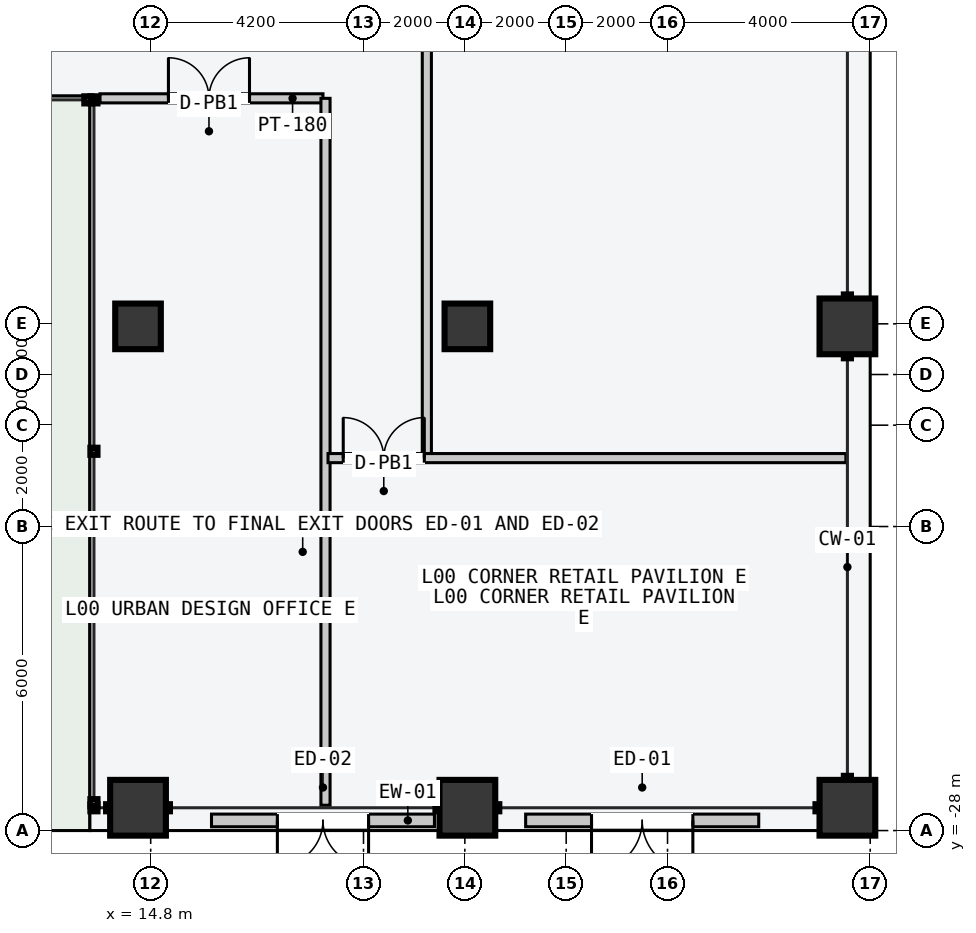
"""IFC4 building model, lengths in metres.
Left out: names, types, materials, properties, quantities, classifications, styles, units other than length and angle.
Written with IfcOpenShell. Run it as: python <this file> out.ifc"""

import sys

from ifc_helpers import new_model, si_unit, direction, frame, frame_2d, origin, origin_2d, place, context, subcontext, project, spatial, rectangle, hollow_rectangle, extrude, element, fill, save


model = new_model("IFC4")
c1 = context("Model", 3, precision=1e-05, world=origin(), true_north=direction((0.0, 1.0)))
c2 = subcontext(c1, "Body", "Model", "MODEL_VIEW")
j1 = project(units=[si_unit("LENGTHUNIT", "METRE"), si_unit("PLANEANGLEUNIT", "RADIAN")], contexts=[c1])
p1 = place(None, origin())
s1 = spatial("IfcSite", under=j1, at=p1, CompositionType="ELEMENT")
p2 = place(p1, origin())
s2 = spatial("IfcBuilding", under=s1, at=p2, CompositionType="ELEMENT")
p3 = place(p2, origin())
s3 = spatial("IfcBuildingStorey", under=s2, at=p3, CompositionType="ELEMENT", Elevation=0.0)
for number, where, z_axis, x_axis in (
    (1, (14.55, -18.05, 0.0), (0.0, 0.0, 1.0), (1.0, 0.0, 0.0)),
    (2, (21.05, -18.05, 0.0), (0.0, 0.0, 1.0), (1.0, 0.0, 0.0)),
):
    element("IfcColumn", number, at=place(p3, frame(where, z_axis=z_axis, x_axis=x_axis)), inside=s3, PredefinedType="COLUMN", context=c2, shape_type="SweptSolid", body=[
        extrude(hollow_rectangle(XDim=0.9, YDim=0.9, WallThickness=0.045, at=origin_2d()), origin(), (0.0, 0.0, 1.0), 4.8),
    ])
for number, where, z_axis, x_axis in (
    (3, (14.55, -27.55, 0.0), (0.0, 0.0, 1.0), (1.0, 0.0, 0.0)),
    (4, (21.05, -27.55, 0.0), (0.0, 0.0, 1.0), (1.0, 0.0, 0.0)),
    (5, (28.55, -27.55, 0.0), (0.0, 0.0, 1.0), (1.0, 0.0, 0.0)),
    (6, (28.55, -18.05, 0.0), (0.0, 0.0, 1.0), (0.0, 1.0, 0.0)),
):
    element("IfcColumn", number, at=place(p3, frame(where, z_axis=z_axis, x_axis=x_axis)), inside=s3, PredefinedType="COLUMN", context=c2, shape_type="SweptSolid", body=[
        extrude(hollow_rectangle(XDim=1.1, YDim=1.1, WallThickness=0.055, at=origin_2d()), origin(), (0.0, 0.0, 1.0), 4.8),
    ])
p4 = place(p3, frame((20.25, -20.6, 0.0), z_axis=(0.0, 0.0, 1.0), x_axis=(0.0, 1.0, 0.0)))
e7 = element("IfcWall", 7, at=p4, inside=s3, PredefinedType="PARTITIONING", context=c2, shape_type="SweptSolid", body=[
    extrude(rectangle(XDim=37.3, YDim=0.18, at=frame_2d((18.65, 0.0))), origin(), (0.0, 0.0, 1.0), 4.58),
])
p5 = place(p4, frame((13.925, 0.0, 0.0)))
e8 = element("IfcOpeningElement", 8, at=p5, cuts=e7, PredefinedType="OPENING", context=c2, shape_type="SweptSolid", body=[
    extrude(rectangle(XDim=1.6, YDim=2.3, at=frame_2d((0.8, 1.15))), frame((0.0, 0.1, 0.0), z_axis=(0.0, -1.0, 0.0), x_axis=(1.0, 0.0, 0.0)), (0.0, 0.0, 1.0), 0.2),
])
p6 = place(p4, frame((28.975, 0.0, 0.0)))
e9 = element("IfcOpeningElement", 9, at=p6, cuts=e7, PredefinedType="OPENING", context=c2, shape_type="SweptSolid", body=[
    extrude(rectangle(XDim=1.6, YDim=2.3, at=frame_2d((0.8, 1.15))), frame((0.0, 0.1, 0.0), z_axis=(0.0, -1.0, 0.0), x_axis=(1.0, 0.0, 0.0)), (0.0, 0.0, 1.0), 0.2),
])
p7 = place(p3, frame((13.8, -13.55, 0.0), z_axis=(0.0, 0.0, 1.0), x_axis=(1.0, 0.0, 0.0)))
e10 = element("IfcWall", 10, at=p7, inside=s3, PredefinedType="PARTITIONING", context=c2, shape_type="SweptSolid", body=[
    extrude(rectangle(XDim=4.4, YDim=0.18, at=frame_2d((2.2, 0.0))), origin(), (0.0, 0.0, 1.0), 4.58),
])
p8 = place(p7, frame((1.35, 0.0, 0.0)))
e11 = element("IfcOpeningElement", 11, at=p8, cuts=e10, PredefinedType="OPENING", context=c2, shape_type="SweptSolid", body=[
    extrude(rectangle(XDim=1.6, YDim=2.3, at=frame_2d((0.8, 1.15))), frame((0.0, 0.1, 0.0), z_axis=(0.0, -1.0, 0.0), x_axis=(1.0, 0.0, 0.0)), (0.0, 0.0, 1.0), 0.2),
])
p9 = place(p3, frame((18.25, -27.5, 0.0), z_axis=(0.0, 0.0, 1.0), x_axis=(0.0, 1.0, 0.0)))
e12 = element("IfcWall", 12, at=p9, inside=s3, PredefinedType="PARTITIONING", context=c2, shape_type="SweptSolid", body=[
    extrude(rectangle(XDim=13.95, YDim=0.18, at=frame_2d((6.975, 0.0))), origin(), (0.0, 0.0, 1.0), 4.58),
])
p10 = place(p3, frame((18.3, -20.65, 0.0), z_axis=(0.0, 0.0, 1.0), x_axis=(1.0, 0.0, 0.0)))
e13 = element("IfcWall", 13, at=p10, inside=s3, PredefinedType="PARTITIONING", context=c2, shape_type="SweptSolid", body=[
    extrude(rectangle(XDim=10.22, YDim=0.18, at=frame_2d((5.11, 0.0))), origin(), (0.0, 0.0, 1.0), 4.58),
])
p11 = place(p10, frame((0.3, 0.0, 0.0)))
e14 = element("IfcOpeningElement", 14, at=p11, cuts=e13, PredefinedType="OPENING", context=c2, shape_type="SweptSolid", body=[
    extrude(rectangle(XDim=1.6, YDim=2.3, at=frame_2d((0.8, 1.15))), frame((0.0, 0.1, 0.0), z_axis=(0.0, -1.0, 0.0), x_axis=(1.0, 0.0, 0.0)), (0.0, 0.0, 1.0), 0.2),
])
p12 = place(p3, frame((20.4, -27.8, 0.0), z_axis=(0.0, 0.0, 1.0), x_axis=(-1.0, 0.0, 0.0)))
e15 = element("IfcWall", 15, at=p12, inside=s3, PredefinedType="STANDARD", context=c2, shape_type="SweptSolid", body=[
    extrude(rectangle(XDim=4.4, YDim=0.25, at=frame_2d((2.2, 0.0))), origin(), (0.0, 0.0, 1.0), 4.58),
])
p13 = place(p12, frame((1.3, 0.0, 0.0)))
e16 = element("IfcOpeningElement", 16, at=p13, cuts=e15, PredefinedType="OPENING", context=c2, shape_type="SweptSolid", body=[
    extrude(rectangle(XDim=1.8, YDim=2.4, at=frame_2d((0.9, 1.2))), frame((0.0, 0.135, 0.0), z_axis=(0.0, -1.0, 0.0), x_axis=(1.0, 0.0, 0.0)), (0.0, 0.0, 1.0), 0.27),
])
p14 = place(p3, frame((26.8, -27.8, 0.0), z_axis=(0.0, 0.0, 1.0), x_axis=(-1.0, 0.0, 0.0)))
e17 = element("IfcWall", 17, at=p14, inside=s3, PredefinedType="STANDARD", context=c2, shape_type="SweptSolid", body=[
    extrude(rectangle(XDim=4.6, YDim=0.25, at=frame_2d((2.3, 0.0))), origin(), (0.0, 0.0, 1.0), 4.58),
])
p15 = place(p14, frame((1.3, 0.0, 0.0)))
e18 = element("IfcOpeningElement", 18, at=p15, cuts=e17, PredefinedType="OPENING", context=c2, shape_type="SweptSolid", body=[
    extrude(rectangle(XDim=2.0, YDim=2.4, at=frame_2d((1.0, 1.2))), frame((0.0, 0.135, 0.0), z_axis=(0.0, -1.0, 0.0), x_axis=(1.0, 0.0, 0.0)), (0.0, 0.0, 1.0), 0.27),
])
p16 = place(p8, origin())
e19 = element("IfcDoor", 19, at=p16, inside=s3, OperationType="DOUBLE_DOOR_SINGLE_SWING", PredefinedType="DOOR", context=c2, shape_type="SweptSolid", body=[
    extrude(rectangle(XDim=1.6, YDim=2.3, at=frame_2d((0.8, 1.15))), frame((0.0, 0.025, 0.0), z_axis=(0.0, -1.0, 0.0), x_axis=(1.0, 0.0, 0.0)), (0.0, 0.0, 1.0), 0.05),
])
fill(e11, e19)
p17 = place(p11, origin())
e20 = element("IfcDoor", 20, at=p17, inside=s3, OperationType="DOUBLE_DOOR_SINGLE_SWING", PredefinedType="DOOR", context=c2, shape_type="SweptSolid", body=[
    extrude(rectangle(XDim=1.6, YDim=2.3, at=frame_2d((0.8, 1.15))), frame((0.0, 0.025, 0.0), z_axis=(0.0, -1.0, 0.0), x_axis=(1.0, 0.0, 0.0)), (0.0, 0.0, 1.0), 0.05),
])
fill(e14, e20)
p18 = place(p13, origin())
e21 = element("IfcDoor", 21, at=p18, inside=s3, OperationType="DOUBLE_DOOR_SINGLE_SWING", PredefinedType="DOOR", context=c2, shape_type="SweptSolid", body=[
    extrude(rectangle(XDim=1.8, YDim=2.4, at=frame_2d((0.9, 1.2))), frame((0.0, 0.025, 0.0), z_axis=(0.0, -1.0, 0.0), x_axis=(1.0, 0.0, 0.0)), (0.0, 0.0, 1.0), 0.05),
])
fill(e16, e21)
p19 = place(p15, origin())
e22 = element("IfcDoor", 22, at=p19, inside=s3, OperationType="DOUBLE_DOOR_SINGLE_SWING", PredefinedType="DOOR", context=c2, shape_type="SweptSolid", body=[
    extrude(rectangle(XDim=2.0, YDim=2.4, at=frame_2d((1.0, 1.2))), frame((0.0, 0.025, 0.0), z_axis=(0.0, -1.0, 0.0), x_axis=(1.0, 0.0, 0.0)), (0.0, 0.0, 1.0), 0.05),
])
fill(e18, e22)
save(model, sys.argv[1])
